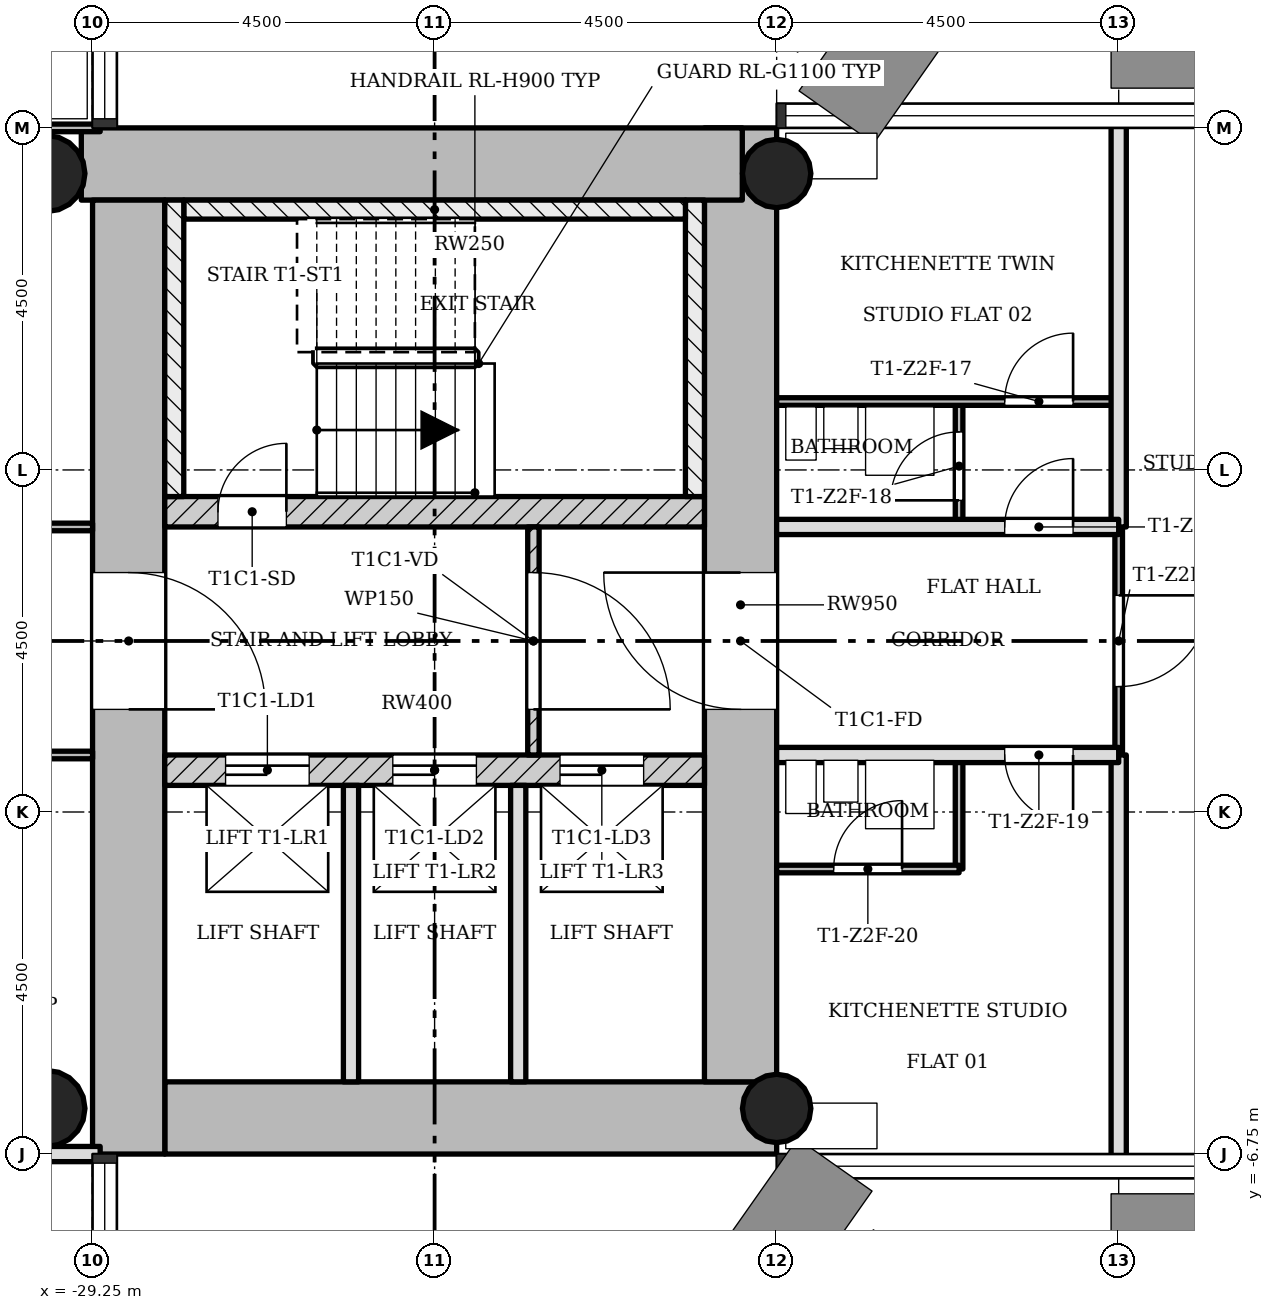
"""IFC4 building model, lengths in metres.
Left out: names, types, materials, properties, quantities, classifications, styles, units other than length and angle.
Written with IfcOpenShell. Run it as: python <this file> out.ifc"""

import sys

from ifc_helpers import new_model, si_unit, direction, frame, frame_2d, origin, origin_2d, place, context, subcontext, project, spatial, rectangle, hollow_circle, extrude, element, fill, save


model = new_model("IFC4")
c1 = context("Model", 3, precision=1e-05, world=origin(), true_north=direction((0.0, 1.0)))
c2 = subcontext(c1, "Body", "Model", "MODEL_VIEW")
j1 = project(units=[si_unit("LENGTHUNIT", "METRE"), si_unit("PLANEANGLEUNIT", "RADIAN")], contexts=[c1])
p1 = place(None, origin())
s1 = spatial("IfcSite", under=j1, at=p1, CompositionType="ELEMENT")
p2 = place(p1, origin())
s2 = spatial("IfcBuilding", under=s1, at=p2, CompositionType="ELEMENT")
p3 = place(p2, frame((0.0, 0.0, 107.2)))
s3 = spatial("IfcBuildingStorey", under=s2, at=p3, CompositionType="ELEMENT", Elevation=107.2)
p4 = place(p3, frame((-28.3, -6.275, 0.0), z_axis=(0.0, 0.0, 1.0), x_axis=(1.0, 0.0, 0.0)))
e1 = element("IfcWall", 1, at=p4, inside=s3, PredefinedType="SHEAR", context=c2, shape_type="SweptSolid", body=[
    extrude(rectangle(XDim=8.05, YDim=0.95, at=frame_2d((4.025, 0.0))), origin(), (0.0, 0.0, 1.0), 3.4),
])
p5 = place(p3, frame((-20.725, -5.8, 0.0), z_axis=(0.0, 0.0, 1.0), x_axis=(0.0, 1.0, 0.0)))
e2 = element("IfcWall", 2, at=p5, inside=s3, PredefinedType="SHEAR", context=c2, shape_type="SweptSolid", body=[
    extrude(rectangle(XDim=12.55, YDim=0.95, at=frame_2d((6.275, 0.0))), origin(), (0.0, 0.0, 1.0), 3.4),
])
p6 = place(p5, frame((4.9, 0.0, 0.0)))
e3 = element("IfcOpeningElement", 3, at=p6, cuts=e2, PredefinedType="OPENING", context=c2, shape_type="SweptSolid", body=[
    extrude(rectangle(XDim=1.8, YDim=2.1, at=frame_2d((0.9, 1.05))), frame((0.0, 0.485, 0.0), z_axis=(0.0, -1.0, 0.0), x_axis=(1.0, 0.0, 0.0)), (0.0, 0.0, 1.0), 0.97),
])
p7 = place(p3, frame((-20.702, 6.275, 0.0), z_axis=(0.0, 0.0, 1.0), x_axis=(-1.0, 0.0, 0.0)))
e4 = element("IfcWall", 4, at=p7, inside=s3, PredefinedType="SHEAR", context=c2, shape_type="SweptSolid", body=[
    extrude(rectangle(XDim=8.696, YDim=0.95, at=frame_2d((4.348, 0.0))), origin(), (0.0, 0.0, 1.0), 3.4),
])
p8 = place(p3, frame((-28.775, 5.8, 0.0), z_axis=(0.0, 0.0, 1.0), x_axis=(0.0, -1.0, 0.0)))
e5 = element("IfcWall", 5, at=p8, inside=s3, PredefinedType="SHEAR", context=c2, shape_type="SweptSolid", body=[
    extrude(rectangle(XDim=12.55, YDim=0.95, at=frame_2d((6.275, 0.0))), origin(), (0.0, 0.0, 1.0), 3.4),
])
p9 = place(p8, frame((4.9, 0.0, 0.0)))
e6 = element("IfcOpeningElement", 6, at=p9, cuts=e5, PredefinedType="OPENING", context=c2, shape_type="SweptSolid", body=[
    extrude(rectangle(XDim=1.8, YDim=2.1, at=frame_2d((0.9, 1.05))), frame((0.0, 0.485, 0.0), z_axis=(0.0, -1.0, 0.0), x_axis=(1.0, 0.0, 0.0)), (0.0, 0.0, 1.0), 0.97),
])
p10 = place(p3, frame((-28.3, -1.7, 0.0), z_axis=(0.0, 0.0, 1.0), x_axis=(1.0, 0.0, 0.0)))
e7 = element("IfcWall", 7, at=p10, inside=s3, PredefinedType="SHEAR", context=c2, shape_type="SweptSolid", body=[
    extrude(rectangle(XDim=7.1, YDim=0.4, at=frame_2d((3.55, 0.0))), origin(), (0.0, 0.0, 1.0), 3.4),
])
p11 = place(p10, frame((0.8, 0.0, 0.0)))
e8 = element("IfcOpeningElement", 8, at=p11, cuts=e7, PredefinedType="OPENING", context=c2, shape_type="SweptSolid", body=[
    extrude(rectangle(XDim=1.1, YDim=2.1, at=frame_2d((0.55, 1.05))), frame((0.0, 0.21, 0.0), z_axis=(0.0, -1.0, 0.0), x_axis=(1.0, 0.0, 0.0)), (0.0, 0.0, 1.0), 0.42),
])
p12 = place(p10, frame((3.0, 0.0, 0.0)))
e9 = element("IfcOpeningElement", 9, at=p12, cuts=e7, PredefinedType="OPENING", context=c2, shape_type="SweptSolid", body=[
    extrude(rectangle(XDim=1.1, YDim=2.1, at=frame_2d((0.55, 1.05))), frame((0.0, 0.21, 0.0), z_axis=(0.0, -1.0, 0.0), x_axis=(1.0, 0.0, 0.0)), (0.0, 0.0, 1.0), 0.42),
])
p13 = place(p10, frame((5.2, 0.0, 0.0)))
e10 = element("IfcOpeningElement", 10, at=p13, cuts=e7, PredefinedType="OPENING", context=c2, shape_type="SweptSolid", body=[
    extrude(rectangle(XDim=1.1, YDim=2.1, at=frame_2d((0.55, 1.05))), frame((0.0, 0.21, 0.0), z_axis=(0.0, -1.0, 0.0), x_axis=(1.0, 0.0, 0.0)), (0.0, 0.0, 1.0), 0.42),
])
p14 = place(p3, frame((-28.3, 1.7, 0.0), z_axis=(0.0, 0.0, 1.0), x_axis=(1.0, 0.0, 0.0)))
e11 = element("IfcWall", 11, at=p14, inside=s3, PredefinedType="SHEAR", context=c2, shape_type="SweptSolid", body=[
    extrude(rectangle(XDim=7.1, YDim=0.4, at=frame_2d((3.55, 0.0))), origin(), (0.0, 0.0, 1.0), 3.4),
])
p15 = place(p14, frame((0.7, 0.0, 0.0)))
e12 = element("IfcOpeningElement", 12, at=p15, cuts=e11, PredefinedType="OPENING", context=c2, shape_type="SweptSolid", body=[
    extrude(rectangle(XDim=0.9, YDim=2.1, at=frame_2d((0.45, 1.05))), frame((0.0, 0.21, 0.0), z_axis=(0.0, -1.0, 0.0), x_axis=(1.0, 0.0, 0.0)), (0.0, 0.0, 1.0), 0.42),
])
for number, where, z_axis, x_axis in (
    (13, (-20.25, -6.15, 0.0), (0.0, 0.0, 1.0), (1.0, 0.0, 0.0)),
    (14, (-20.25, 6.15, 0.0), (0.0, 0.0, 1.0), (1.0, 0.0, 0.0)),
):
    element("IfcColumn", number, at=place(p3, frame(where, z_axis=z_axis, x_axis=x_axis)), inside=s3, PredefinedType="COLUMN", context=c2, shape_type="SweptSolid", body=[
        extrude(hollow_circle(Radius=0.45, WallThickness=0.032, at=origin_2d()), origin(), (0.0, 0.0, 1.0), 3.4),
    ])
for number, where, z_axis, x_axis in (
    (15, (-29.85, -6.15, 0.0), (0.0, 0.0, 1.0), (1.0, 0.0, 0.0)),
    (16, (-29.85, 6.15, 0.0), (0.0, 0.0, 1.0), (1.0, 0.0, 0.0)),
):
    element("IfcColumn", number, at=place(p3, frame(where, z_axis=z_axis, x_axis=x_axis)), inside=s3, PredefinedType="COLUMN", context=c2, shape_type="SweptSolid", body=[
        extrude(hollow_circle(Radius=0.5, WallThickness=0.036, at=origin_2d()), origin(), (0.0, 0.0, 1.0), 3.4),
    ])
p16 = place(p3, frame((-23.45, -1.5, 0.0), z_axis=(0.0, 0.0, 1.0), x_axis=(0.0, 1.0, 0.0)))
e17 = element("IfcWall", 17, at=p16, inside=s3, PredefinedType="PARTITIONING", context=c2, shape_type="SweptSolid", body=[
    extrude(rectangle(XDim=3.0, YDim=0.15, at=frame_2d((1.5, 0.0))), origin(), (0.0, 0.0, 1.0), 3.0),
])
p17 = place(p16, frame((0.6, 0.0, 0.0)))
e18 = element("IfcOpeningElement", 18, at=p17, cuts=e17, PredefinedType="OPENING", context=c2, shape_type="SweptSolid", body=[
    extrude(rectangle(XDim=1.8, YDim=2.1, at=frame_2d((0.9, 1.05))), frame((0.0, 0.085, 0.0), z_axis=(0.0, -1.0, 0.0), x_axis=(1.0, 0.0, 0.0)), (0.0, 0.0, 1.0), 0.17),
])
for number, where, z_axis, x_axis in (
    (19, (-25.85, -5.8, 0.0), (0.0, 0.0, 1.0), (0.0, 1.0, 0.0)),
    (20, (-23.65, -5.8, 0.0), (0.0, 0.0, 1.0), (0.0, 1.0, 0.0)),
):
    element("IfcWall", number, at=place(p3, frame(where, z_axis=z_axis, x_axis=x_axis)), inside=s3, PredefinedType="SOLIDWALL", context=c2, shape_type="SweptSolid", body=[
        extrude(rectangle(XDim=3.9, YDim=0.2, at=frame_2d((1.95, 0.0))), origin(), (0.0, 0.0, 1.0), 3.0),
    ])
p18 = place(p3, frame((-17.85, -3.0, 0.0), z_axis=(0.0, 0.0, 1.0), x_axis=(0.0, 1.0, 0.0)))
e21 = element("IfcWall", 21, at=p18, inside=s3, PredefinedType="PARTITIONING", context=c2, shape_type="SweptSolid", body=[
    extrude(rectangle(XDim=1.5, YDim=0.1, at=frame_2d((0.75, 0.0))), origin(), (0.0, 0.0, 1.0), 3.0),
])
p19 = place(p3, frame((-17.85, 1.5, 0.0), z_axis=(0.0, 0.0, 1.0), x_axis=(0.0, 1.0, 0.0)))
e22 = element("IfcWall", 22, at=p19, inside=s3, PredefinedType="PARTITIONING", context=c2, shape_type="SweptSolid", body=[
    extrude(rectangle(XDim=1.65, YDim=0.1, at=frame_2d((0.825, 0.0))), origin(), (0.0, 0.0, 1.0), 3.0),
])
p20 = place(p19, frame((0.35, 0.0, 0.0)))
e23 = element("IfcOpeningElement", 23, at=p20, cuts=e22, PredefinedType="OPENING", context=c2, shape_type="SweptSolid", body=[
    extrude(rectangle(XDim=0.9, YDim=2.1, at=frame_2d((0.45, 1.05))), frame((0.0, 0.06, 0.0), z_axis=(0.0, -1.0, 0.0), x_axis=(1.0, 0.0, 0.0)), (0.0, 0.0, 1.0), 0.12),
])
p21 = place(p3, frame((-15.75, -1.5, 0.0), z_axis=(0.0, 0.0, 1.0), x_axis=(0.0, 1.0, 0.0)))
e24 = element("IfcWall", 24, at=p21, inside=s3, PredefinedType="PARTITIONING", context=c2, shape_type="SweptSolid", body=[
    extrude(rectangle(XDim=3.0, YDim=0.1, at=frame_2d((1.5, 0.0))), origin(), (0.0, 0.0, 1.0), 3.0),
])
p22 = place(p21, frame((0.9, 0.0, 0.0)))
e25 = element("IfcOpeningElement", 25, at=p22, cuts=e24, PredefinedType="OPENING", context=c2, shape_type="SweptSolid", body=[
    extrude(rectangle(XDim=1.2, YDim=2.1, at=frame_2d((0.6, 1.05))), frame((0.0, 0.06, 0.0), z_axis=(0.0, -1.0, 0.0), x_axis=(1.0, 0.0, 0.0)), (0.0, 0.0, 1.0), 0.12),
])
for number, where, z_axis, x_axis in (
    (26, (-15.75, -6.85, 0.0), (0.0, 0.0, 1.0), (0.0, 1.0, 0.0)),
    (27, (-15.75, 1.5, 0.0), (0.0, 0.0, 1.0), (0.0, 1.0, 0.0)),
):
    element("IfcWall", number, at=place(p3, frame(where, z_axis=z_axis, x_axis=x_axis)), inside=s3, PredefinedType="SOLIDWALL", context=c2, shape_type="SweptSolid", body=[
        extrude(rectangle(XDim=5.35, YDim=0.2, at=frame_2d((2.675, 0.0))), origin(), (0.0, 0.0, 1.0), 3.0),
    ])
p23 = place(p3, frame((-35.1, -6.75, 0.0), z_axis=(0.0, 0.0, 1.0), x_axis=(1.0, 0.0, 0.0)))
e28 = element("IfcWall", 28, at=p23, inside=s3, PredefinedType="SOLIDWALL", context=c2, shape_type="SweptSolid", body=[
    extrude(rectangle(XDim=5.95, YDim=0.2, at=frame_2d((2.975, 0.0))), origin(), (0.0, 0.0, 1.0), 3.0),
])
p24 = place(p3, frame((-20.25, -3.0, 0.0), z_axis=(0.0, 0.0, 1.0), x_axis=(1.0, 0.0, 0.0)))
e29 = element("IfcWall", 29, at=p24, inside=s3, PredefinedType="PARTITIONING", context=c2, shape_type="SweptSolid", body=[
    extrude(rectangle(XDim=2.4, YDim=0.1, at=frame_2d((1.2, 0.0))), origin(), (0.0, 0.0, 1.0), 3.0),
])
p25 = place(p24, frame((0.75, 0.0, 0.0)))
e30 = element("IfcOpeningElement", 30, at=p25, cuts=e29, PredefinedType="OPENING", context=c2, shape_type="SweptSolid", body=[
    extrude(rectangle(XDim=0.9, YDim=2.1, at=frame_2d((0.45, 1.05))), frame((0.0, 0.06, 0.0), z_axis=(0.0, -1.0, 0.0), x_axis=(1.0, 0.0, 0.0)), (0.0, 0.0, 1.0), 0.12),
])
p26 = place(p3, frame((-35.1, -1.5, 0.0), z_axis=(0.0, 0.0, 1.0), x_axis=(1.0, 0.0, 0.0)))
e31 = element("IfcWall", 31, at=p26, inside=s3, PredefinedType="PARTITIONING", context=c2, shape_type="SweptSolid", body=[
    extrude(rectangle(XDim=5.85, YDim=0.1, at=frame_2d((2.925, 0.0))), origin(), (0.0, 0.0, 1.0), 3.0),
])
p27 = place(p26, frame((4.125, 0.0, 0.0)))
e32 = element("IfcOpeningElement", 32, at=p27, cuts=e31, PredefinedType="OPENING", context=c2, shape_type="SweptSolid", body=[
    extrude(rectangle(XDim=0.9, YDim=2.1, at=frame_2d((0.45, 1.05))), frame((0.0, 0.06, 0.0), z_axis=(0.0, -1.0, 0.0), x_axis=(1.0, 0.0, 0.0)), (0.0, 0.0, 1.0), 0.12),
])
p28 = place(p3, frame((-20.25, -1.5, 0.0), z_axis=(0.0, 0.0, 1.0), x_axis=(1.0, 0.0, 0.0)))
e33 = element("IfcWall", 33, at=p28, inside=s3, PredefinedType="SOLIDWALL", context=c2, shape_type="SweptSolid", body=[
    extrude(rectangle(XDim=4.5, YDim=0.2, at=frame_2d((2.25, 0.0))), origin(), (0.0, 0.0, 1.0), 3.0),
])
p29 = place(p28, frame((3.0, 0.0, 0.0)))
e34 = element("IfcOpeningElement", 34, at=p29, cuts=e33, PredefinedType="OPENING", context=c2, shape_type="SweptSolid", body=[
    extrude(rectangle(XDim=0.9, YDim=2.1, at=frame_2d((0.45, 1.05))), frame((0.0, 0.11, 0.0), z_axis=(0.0, -1.0, 0.0), x_axis=(1.0, 0.0, 0.0)), (0.0, 0.0, 1.0), 0.22),
])
p30 = place(p3, frame((-35.1, 1.5, 0.0), z_axis=(0.0, 0.0, 1.0), x_axis=(1.0, 0.0, 0.0)))
e35 = element("IfcWall", 35, at=p30, inside=s3, PredefinedType="PARTITIONING", context=c2, shape_type="SweptSolid", body=[
    extrude(rectangle(XDim=5.85, YDim=0.1, at=frame_2d((2.925, 0.0))), origin(), (0.0, 0.0, 1.0), 3.0),
])
p31 = place(p30, frame((3.675, 0.0, 0.0)))
e36 = element("IfcOpeningElement", 36, at=p31, cuts=e35, PredefinedType="OPENING", context=c2, shape_type="SweptSolid", body=[
    extrude(rectangle(XDim=0.9, YDim=2.1, at=frame_2d((0.45, 1.05))), frame((0.0, 0.06, 0.0), z_axis=(0.0, -1.0, 0.0), x_axis=(1.0, 0.0, 0.0)), (0.0, 0.0, 1.0), 0.12),
])
p32 = place(p3, frame((-20.25, 1.5, 0.0), z_axis=(0.0, 0.0, 1.0), x_axis=(1.0, 0.0, 0.0)))
e37 = element("IfcWall", 37, at=p32, inside=s3, PredefinedType="SOLIDWALL", context=c2, shape_type="SweptSolid", body=[
    extrude(rectangle(XDim=4.5, YDim=0.2, at=frame_2d((2.25, 0.0))), origin(), (0.0, 0.0, 1.0), 3.0),
])
p33 = place(p32, frame((3.0, 0.0, 0.0)))
e38 = element("IfcOpeningElement", 38, at=p33, cuts=e37, PredefinedType="OPENING", context=c2, shape_type="SweptSolid", body=[
    extrude(rectangle(XDim=0.9, YDim=2.1, at=frame_2d((0.45, 1.05))), frame((0.0, 0.11, 0.0), z_axis=(0.0, -1.0, 0.0), x_axis=(1.0, 0.0, 0.0)), (0.0, 0.0, 1.0), 0.22),
])
p34 = place(p3, frame((-20.25, 3.15, 0.0), z_axis=(0.0, 0.0, 1.0), x_axis=(1.0, 0.0, 0.0)))
e39 = element("IfcWall", 39, at=p34, inside=s3, PredefinedType="PARTITIONING", context=c2, shape_type="SweptSolid", body=[
    extrude(rectangle(XDim=4.5, YDim=0.1, at=frame_2d((2.25, 0.0))), origin(), (0.0, 0.0, 1.0), 3.0),
])
p35 = place(p34, frame((3.0, 0.0, 0.0)))
e40 = element("IfcOpeningElement", 40, at=p35, cuts=e39, PredefinedType="OPENING", context=c2, shape_type="SweptSolid", body=[
    extrude(rectangle(XDim=0.9, YDim=2.1, at=frame_2d((0.45, 1.05))), frame((0.0, 0.06, 0.0), z_axis=(0.0, -1.0, 0.0), x_axis=(1.0, 0.0, 0.0)), (0.0, 0.0, 1.0), 0.12),
])
p36 = place(p3, frame((-35.1, 6.75, 0.0), z_axis=(0.0, 0.0, 1.0), x_axis=(1.0, 0.0, 0.0)))
e41 = element("IfcWall", 41, at=p36, inside=s3, PredefinedType="PARTITIONING", context=c2, shape_type="SweptSolid", body=[
    extrude(rectangle(XDim=5.95, YDim=0.1, at=frame_2d((2.975, 0.0))), origin(), (0.0, 0.0, 1.0), 3.0),
])
p37 = place(p3, frame((-21.325, 1.9, 0.0), z_axis=(0.0, 0.0, 1.0), x_axis=(0.0, 1.0, 0.0)))
e42 = element("IfcWall", 42, at=p37, inside=s3, PredefinedType="SHEAR", context=c2, shape_type="SweptSolid", body=[
    extrude(rectangle(XDim=3.9, YDim=0.25, at=frame_2d((1.95, 0.0))), origin(), (0.0, 0.0, 1.0), 3.4),
])
p38 = place(p3, frame((-28.05, 5.675, 0.0), z_axis=(0.0, 0.0, 1.0), x_axis=(1.0, 0.0, 0.0)))
e43 = element("IfcWall", 43, at=p38, inside=s3, PredefinedType="SHEAR", context=c2, shape_type="SweptSolid", body=[
    extrude(rectangle(XDim=6.6, YDim=0.25, at=frame_2d((3.3, 0.0))), origin(), (0.0, 0.0, 1.0), 3.4),
])
p39 = place(p3, frame((-28.175, 1.9, 0.0), z_axis=(0.0, 0.0, 1.0), x_axis=(0.0, 1.0, 0.0)))
e44 = element("IfcWall", 44, at=p39, inside=s3, PredefinedType="SHEAR", context=c2, shape_type="SweptSolid", body=[
    extrude(rectangle(XDim=3.9, YDim=0.25, at=frame_2d((1.95, 0.0))), origin(), (0.0, 0.0, 1.0), 3.4),
])
p40 = place(p17, origin())
e45 = element("IfcDoor", 45, at=p40, inside=s3, OperationType="SINGLE_SWING_LEFT", PredefinedType="DOOR", context=c2, shape_type="SweptSolid", body=[
    extrude(rectangle(XDim=1.8, YDim=2.1, at=frame_2d((0.9, 1.05))), frame((0.0, 0.025, 0.0), z_axis=(0.0, -1.0, 0.0), x_axis=(1.0, 0.0, 0.0)), (0.0, 0.0, 1.0), 0.05),
])
fill(e18, e45)
p41 = place(p33, origin())
e46 = element("IfcDoor", 46, at=p41, inside=s3, OperationType="SINGLE_SWING_LEFT", PredefinedType="DOOR", context=c2, shape_type="SweptSolid", body=[
    extrude(rectangle(XDim=0.9, YDim=2.1, at=frame_2d((0.45, 1.05))), frame((0.0, 0.025, 0.0), z_axis=(0.0, -1.0, 0.0), x_axis=(1.0, 0.0, 0.0)), (0.0, 0.0, 1.0), 0.05),
])
fill(e38, e46)
p42 = place(p35, origin())
e47 = element("IfcDoor", 47, at=p42, inside=s3, OperationType="SINGLE_SWING_LEFT", PredefinedType="DOOR", context=c2, shape_type="SweptSolid", body=[
    extrude(rectangle(XDim=0.9, YDim=2.1, at=frame_2d((0.45, 1.05))), frame((0.0, 0.025, 0.0), z_axis=(0.0, -1.0, 0.0), x_axis=(1.0, 0.0, 0.0)), (0.0, 0.0, 1.0), 0.05),
])
fill(e40, e47)
p43 = place(p20, origin())
e48 = element("IfcDoor", 48, at=p43, inside=s3, OperationType="SINGLE_SWING_RIGHT", PredefinedType="DOOR", context=c2, shape_type="SweptSolid", body=[
    extrude(rectangle(XDim=0.9, YDim=2.1, at=frame_2d((0.45, 1.05))), frame((0.0, 0.025, 0.0), z_axis=(0.0, -1.0, 0.0), x_axis=(1.0, 0.0, 0.0)), (0.0, 0.0, 1.0), 0.05),
])
fill(e23, e48)
p44 = place(p29, origin())
e49 = element("IfcDoor", 49, at=p44, inside=s3, OperationType="SINGLE_SWING_RIGHT", PredefinedType="DOOR", context=c2, shape_type="SweptSolid", body=[
    extrude(rectangle(XDim=0.9, YDim=2.1, at=frame_2d((0.45, 1.05))), frame((0.0, 0.025, 0.0), z_axis=(0.0, -1.0, 0.0), x_axis=(1.0, 0.0, 0.0)), (0.0, 0.0, 1.0), 0.05),
])
fill(e34, e49)
p45 = place(p25, origin())
e50 = element("IfcDoor", 50, at=p45, inside=s3, OperationType="SINGLE_SWING_LEFT", PredefinedType="DOOR", context=c2, shape_type="SweptSolid", body=[
    extrude(rectangle(XDim=0.9, YDim=2.1, at=frame_2d((0.45, 1.05))), frame((0.0, 0.025, 0.0), z_axis=(0.0, -1.0, 0.0), x_axis=(1.0, 0.0, 0.0)), (0.0, 0.0, 1.0), 0.05),
])
fill(e30, e50)
p46 = place(p22, origin())
e51 = element("IfcDoor", 51, at=p46, inside=s3, OperationType="SINGLE_SWING_RIGHT", PredefinedType="DOOR", context=c2, shape_type="SweptSolid", body=[
    extrude(rectangle(XDim=1.2, YDim=2.1, at=frame_2d((0.6, 1.05))), frame((0.0, 0.025, 0.0), z_axis=(0.0, -1.0, 0.0), x_axis=(1.0, 0.0, 0.0)), (0.0, 0.0, 1.0), 0.05),
])
fill(e25, e51)
p47 = place(p15, origin())
e52 = element("IfcDoor", 52, at=p47, inside=s3, OperationType="SINGLE_SWING_LEFT", PredefinedType="DOOR", context=c2, shape_type="SweptSolid", body=[
    extrude(rectangle(XDim=0.9, YDim=2.1, at=frame_2d((0.45, 1.05))), frame((0.0, 0.025, 0.0), z_axis=(0.0, -1.0, 0.0), x_axis=(1.0, 0.0, 0.0)), (0.0, 0.0, 1.0), 0.05),
])
fill(e12, e52)
p48 = place(p11, origin())
e53 = element("IfcDoor", 53, at=p48, inside=s3, OperationType="SLIDING_TO_LEFT", PredefinedType="DOOR", context=c2, shape_type="SweptSolid", body=[
    extrude(rectangle(XDim=1.1, YDim=2.1, at=frame_2d((0.55, 1.05))), frame((0.0, 0.025, 0.0), z_axis=(0.0, -1.0, 0.0), x_axis=(1.0, 0.0, 0.0)), (0.0, 0.0, 1.0), 0.05),
])
fill(e8, e53)
p49 = place(p12, origin())
e54 = element("IfcDoor", 54, at=p49, inside=s3, OperationType="SLIDING_TO_LEFT", PredefinedType="DOOR", context=c2, shape_type="SweptSolid", body=[
    extrude(rectangle(XDim=1.1, YDim=2.1, at=frame_2d((0.55, 1.05))), frame((0.0, 0.025, 0.0), z_axis=(0.0, -1.0, 0.0), x_axis=(1.0, 0.0, 0.0)), (0.0, 0.0, 1.0), 0.05),
])
fill(e9, e54)
p50 = place(p13, origin())
e55 = element("IfcDoor", 55, at=p50, inside=s3, OperationType="SLIDING_TO_LEFT", PredefinedType="DOOR", context=c2, shape_type="SweptSolid", body=[
    extrude(rectangle(XDim=1.1, YDim=2.1, at=frame_2d((0.55, 1.05))), frame((0.0, 0.025, 0.0), z_axis=(0.0, -1.0, 0.0), x_axis=(1.0, 0.0, 0.0)), (0.0, 0.0, 1.0), 0.05),
])
fill(e10, e55)
p51 = place(p9, origin())
e56 = element("IfcDoor", 56, at=p51, inside=s3, OperationType="SINGLE_SWING_LEFT", PredefinedType="DOOR", context=c2, shape_type="SweptSolid", body=[
    extrude(rectangle(XDim=1.8, YDim=2.1, at=frame_2d((0.9, 1.05))), frame((0.0, 0.025, 0.0), z_axis=(0.0, -1.0, 0.0), x_axis=(1.0, 0.0, 0.0)), (0.0, 0.0, 1.0), 0.05),
])
fill(e6, e56)
p52 = place(p6, origin())
e57 = element("IfcDoor", 57, at=p52, inside=s3, OperationType="SINGLE_SWING_LEFT", PredefinedType="DOOR", context=c2, shape_type="SweptSolid", body=[
    extrude(rectangle(XDim=1.8, YDim=2.1, at=frame_2d((0.9, 1.05))), frame((0.0, 0.025, 0.0), z_axis=(0.0, -1.0, 0.0), x_axis=(1.0, 0.0, 0.0)), (0.0, 0.0, 1.0), 0.05),
])
fill(e3, e57)
save(model, sys.argv[1])
